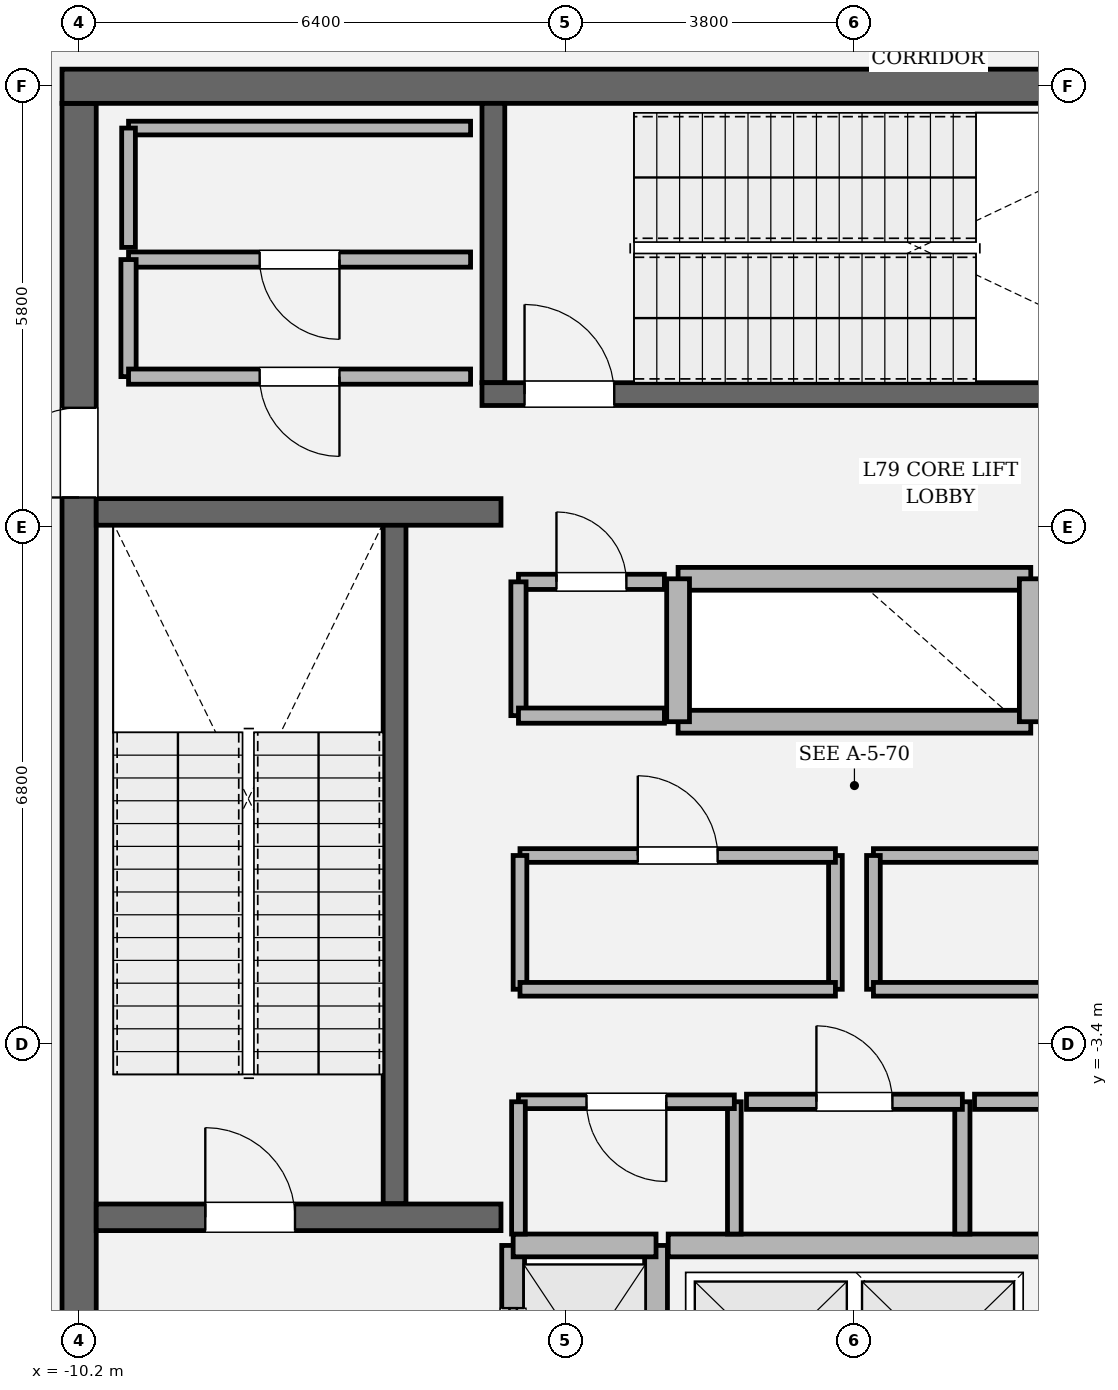
"""IFC4 building model, lengths in metres.
Left out: names, types, materials, properties, quantities, classifications, styles, units other than length and angle.
Written with IfcOpenShell. Run it as: python <this file> out.ifc"""

import sys

from ifc_helpers import new_model, si_unit, direction, frame, frame_2d, origin, place, context, subcontext, project, spatial, rectangle, extrude, element, fill, save


model = new_model("IFC4")
c1 = context("Model", 3, precision=1e-05, world=origin(), true_north=direction((0.0, 1.0)))
c2 = subcontext(c1, "Body", "Model", "MODEL_VIEW")
j1 = project(units=[si_unit("LENGTHUNIT", "METRE"), si_unit("PLANEANGLEUNIT", "RADIAN")], contexts=[c1])
p1 = place(None, origin())
s1 = spatial("IfcSite", under=j1, at=p1, CompositionType="ELEMENT")
p2 = place(p1, origin())
s2 = spatial("IfcBuilding", under=s1, at=p2, CompositionType="ELEMENT")
p3 = place(p2, frame((0.0, 0.0, 334.2)))
s3 = spatial("IfcBuildingStorey", under=s2, at=p3, CompositionType="ELEMENT", Elevation=334.2)
p4 = place(p3, frame((-10.2, -8.975, 0.0), z_axis=(0.0, 0.0, 1.0), x_axis=(0.0, 1.0, 0.0)))
e1 = element("IfcWall", 1, at=p4, inside=s3, PredefinedType="SHEAR", context=c2, shape_type="SweptSolid", body=[
    extrude(rectangle(XDim=17.95, YDim=0.45, at=frame_2d((8.975, 0.0))), origin(), (0.0, 0.0, 1.0), 4.8),
])
p5 = place(p4, frame((12.765, 0.0, 0.0)))
e2 = element("IfcOpeningElement", 2, at=p5, cuts=e1, PredefinedType="OPENING", context=c2, shape_type="SweptSolid", body=[
    extrude(rectangle(XDim=1.18, YDim=2.2, at=frame_2d((0.59, 1.1))), frame((0.0, 0.235, 0.0), z_axis=(0.0, -1.0, 0.0), x_axis=(1.0, 0.0, 0.0)), (0.0, 0.0, 1.0), 0.47),
])
p6 = place(p3, frame((-10.425, 9.2, 0.0), z_axis=(0.0, 0.0, 1.0), x_axis=(1.0, 0.0, 0.0)))
e3 = element("IfcWall", 3, at=p6, inside=s3, PredefinedType="SHEAR", context=c2, shape_type="SweptSolid", body=[
    extrude(rectangle(XDim=20.85, YDim=0.45, at=frame_2d((10.425, 0.0))), origin(), (0.0, 0.0, 1.0), 4.8),
])
p7 = place(p3, frame((-6.05, -5.5, 0.0), z_axis=(0.0, 0.0, 1.0), x_axis=(0.0, 1.0, 0.0)))
e4 = element("IfcWall", 4, at=p7, inside=s3, PredefinedType="SOLIDWALL", context=c2, shape_type="SweptSolid", body=[
    extrude(rectangle(XDim=8.95, YDim=0.3, at=frame_2d((4.475, 0.0))), origin(), (0.0, 0.0, 1.0), 4.8),
])
p8 = place(p3, frame((-4.75, 5.3, 0.0), z_axis=(0.0, 0.0, 1.0), x_axis=(0.0, 1.0, 0.0)))
e5 = element("IfcWall", 5, at=p8, inside=s3, PredefinedType="SOLIDWALL", context=c2, shape_type="SweptSolid", body=[
    extrude(rectangle(XDim=3.675, YDim=0.3, at=frame_2d((1.837, 0.0))), origin(), (0.0, 0.0, 1.0), 4.8),
])
p9 = place(p3, frame((-4.9, 5.15, 0.0), z_axis=(0.0, 0.0, 1.0), x_axis=(1.0, 0.0, 0.0)))
e6 = element("IfcWall", 6, at=p9, inside=s3, PredefinedType="SOLIDWALL", context=c2, shape_type="SweptSolid", body=[
    extrude(rectangle(XDim=9.8, YDim=0.3, at=frame_2d((4.9, 0.0))), origin(), (0.0, 0.0, 1.0), 4.8),
])
p10 = place(p9, frame((0.56, 0.0, 0.0)))
e7 = element("IfcOpeningElement", 7, at=p10, cuts=e6, PredefinedType="OPENING", context=c2, shape_type="SweptSolid", body=[
    extrude(rectangle(XDim=1.18, YDim=2.2, at=frame_2d((0.59, 1.1))), frame((0.0, 0.16, 0.0), z_axis=(0.0, -1.0, 0.0), x_axis=(1.0, 0.0, 0.0)), (0.0, 0.0, 1.0), 0.32),
])
p11 = place(p3, frame((-9.975, -5.68, 0.0), z_axis=(0.0, 0.0, 1.0), x_axis=(1.0, 0.0, 0.0)))
e8 = element("IfcWall", 8, at=p11, inside=s3, PredefinedType="SOLIDWALL", context=c2, shape_type="SweptSolid", body=[
    extrude(rectangle(XDim=5.325, YDim=0.35, at=frame_2d((2.663, 0.0))), origin(), (0.0, 0.0, 1.0), 4.8),
])
p12 = place(p11, frame((1.435, 0.0, 0.0)))
e9 = element("IfcOpeningElement", 9, at=p12, cuts=e8, PredefinedType="OPENING", context=c2, shape_type="SweptSolid", body=[
    extrude(rectangle(XDim=1.18, YDim=2.2, at=frame_2d((0.59, 1.1))), frame((0.0, 0.185, 0.0), z_axis=(0.0, -1.0, 0.0), x_axis=(1.0, 0.0, 0.0)), (0.0, 0.0, 1.0), 0.37),
])
p13 = place(p3, frame((-9.975, 3.6, 0.0), z_axis=(0.0, 0.0, 1.0), x_axis=(1.0, 0.0, 0.0)))
e10 = element("IfcWall", 10, at=p13, inside=s3, PredefinedType="SOLIDWALL", context=c2, shape_type="SweptSolid", body=[
    extrude(rectangle(XDim=5.325, YDim=0.35, at=frame_2d((2.663, 0.0))), origin(), (0.0, 0.0, 1.0), 4.8),
])
p14 = place(p3, frame((-4.49, -8.82, 0.0), z_axis=(0.0, 0.0, 1.0), x_axis=(0.0, 1.0, 0.0)))
e11 = element("IfcWall", 11, at=p14, inside=s3, PredefinedType="SOLIDWALL", context=c2, shape_type="SweptSolid", body=[
    extrude(rectangle(XDim=2.77, YDim=0.3, at=frame_2d((1.385, 0.0))), origin(), (0.0, 0.0, 1.0), 4.54),
])
p15 = place(p14, frame((0.825, 0.0, 0.0)))
e12 = element("IfcOpeningElement", 12, at=p15, cuts=e11, PredefinedType="OPENING", context=c2, shape_type="SweptSolid", body=[
    extrude(rectangle(XDim=1.12, YDim=2.25, at=frame_2d((0.56, 1.125))), frame((0.0, 0.16, 0.0), z_axis=(0.0, -1.0, 0.0), x_axis=(1.0, 0.0, 0.0)), (0.0, 0.0, 1.0), 0.32),
])
p16 = place(p3, frame((-2.61, -8.82, 0.0), z_axis=(0.0, 0.0, 1.0), x_axis=(0.0, 1.0, 0.0)))
e13 = element("IfcWall", 13, at=p16, inside=s3, PredefinedType="SOLIDWALL", context=c2, shape_type="SweptSolid", body=[
    extrude(rectangle(XDim=2.77, YDim=0.3, at=frame_2d((1.385, 0.0))), origin(), (0.0, 0.0, 1.0), 4.54),
])
p17 = place(p3, frame((-4.49, -6.05, 0.0), z_axis=(0.0, 0.0, 1.0), x_axis=(1.0, 0.0, 0.0)))
e14 = element("IfcWall", 14, at=p17, inside=s3, PredefinedType="SOLIDWALL", context=c2, shape_type="SweptSolid", body=[
    extrude(rectangle(XDim=1.88, YDim=0.3, at=frame_2d((0.94, 0.0))), origin(), (0.0, 0.0, 1.0), 4.54),
])
for number, where, z_axis, x_axis in (
    (15, (-2.32, 0.84, 0.0), (0.0, 0.0, 1.0), (1.0, 0.0, 0.0)),
    (16, (-2.32, 2.72, 0.0), (0.0, 0.0, 1.0), (1.0, 0.0, 0.0)),
):
    element("IfcWall", number, at=place(p3, frame(where, z_axis=z_axis, x_axis=x_axis)), inside=s3, PredefinedType="SOLIDWALL", context=c2, shape_type="SweptSolid", body=[
        extrude(rectangle(XDim=4.64, YDim=0.3, at=frame_2d((2.32, 0.0))), origin(), (0.0, 0.0, 1.0), 4.54),
    ])
for number, where, z_axis, x_axis in (
    (17, (-2.32, 0.84, 0.0), (0.0, 0.0, 1.0), (0.0, 1.0, 0.0)),
    (18, (2.32, 0.84, 0.0), (0.0, 0.0, 1.0), (0.0, 1.0, 0.0)),
):
    element("IfcWall", number, at=place(p3, frame(where, z_axis=z_axis, x_axis=x_axis)), inside=s3, PredefinedType="SOLIDWALL", context=c2, shape_type="SweptSolid", body=[
        extrude(rectangle(XDim=1.88, YDim=0.3, at=frame_2d((0.94, 0.0))), origin(), (0.0, 0.0, 1.0), 4.54),
    ])
p18 = place(p3, frame((-2.45, -6.05, 0.0), z_axis=(0.0, 0.0, 1.0), x_axis=(1.0, 0.0, 0.0)))
e19 = element("IfcWall", 19, at=p18, inside=s3, PredefinedType="SOLIDWALL", context=c2, shape_type="SweptSolid", body=[
    extrude(rectangle(XDim=4.9, YDim=0.3, at=frame_2d((2.45, 0.0))), origin(), (0.0, 0.0, 1.0), 4.54),
])
p19 = place(p3, frame((-1.58, -5.9, 0.0), z_axis=(0.0, 0.0, 1.0), x_axis=(0.0, 1.0, 0.0)))
e20 = element("IfcWall", 20, at=p19, inside=s3, PredefinedType="PARTITIONING", context=c2, shape_type="SweptSolid", body=[
    extrude(rectangle(XDim=1.74, YDim=0.18, at=frame_2d((0.87, 0.0))), origin(), (0.0, 0.0, 1.0), 4.54),
])
p20 = place(p3, frame((-1.58, -4.16, 0.0), z_axis=(0.0, 0.0, 1.0), x_axis=(-1.0, 0.0, 0.0)))
e21 = element("IfcWall", 21, at=p20, inside=s3, PredefinedType="PARTITIONING", context=c2, shape_type="SweptSolid", body=[
    extrude(rectangle(XDim=2.84, YDim=0.18, at=frame_2d((1.42, 0.0))), origin(), (0.0, 0.0, 1.0), 4.54),
])
p21 = place(p20, frame((0.895, 0.0, 0.0)))
e22 = element("IfcOpeningElement", 22, at=p21, cuts=e21, PredefinedType="OPENING", context=c2, shape_type="SweptSolid", body=[
    extrude(rectangle(XDim=1.05, YDim=2.2, at=frame_2d((0.525, 1.1))), frame((0.0, 0.1, 0.0), z_axis=(0.0, -1.0, 0.0), x_axis=(1.0, 0.0, 0.0)), (0.0, 0.0, 1.0), 0.2),
])
p22 = place(p3, frame((-4.42, -4.16, 0.0), z_axis=(0.0, 0.0, 1.0), x_axis=(0.0, -1.0, 0.0)))
e23 = element("IfcWall", 23, at=p22, inside=s3, PredefinedType="PARTITIONING", context=c2, shape_type="SweptSolid", body=[
    extrude(rectangle(XDim=1.74, YDim=0.18, at=frame_2d((0.87, 0.0))), origin(), (0.0, 0.0, 1.0), 4.54),
])
p23 = place(p3, frame((1.42, -5.9, 0.0), z_axis=(0.0, 0.0, 1.0), x_axis=(0.0, 1.0, 0.0)))
e24 = element("IfcWall", 24, at=p23, inside=s3, PredefinedType="SOLIDWALL", context=c2, shape_type="SweptSolid", body=[
    extrude(rectangle(XDim=1.74, YDim=0.2, at=frame_2d((0.87, 0.0))), origin(), (0.0, 0.0, 1.0), 4.54),
])
p24 = place(p3, frame((1.42, -4.16, 0.0), z_axis=(0.0, 0.0, 1.0), x_axis=(-1.0, 0.0, 0.0)))
e25 = element("IfcWall", 25, at=p24, inside=s3, PredefinedType="SOLIDWALL", context=c2, shape_type="SweptSolid", body=[
    extrude(rectangle(XDim=2.84, YDim=0.2, at=frame_2d((1.42, 0.0))), origin(), (0.0, 0.0, 1.0), 4.54),
])
p25 = place(p24, frame((0.92, 0.0, 0.0)))
e26 = element("IfcOpeningElement", 26, at=p25, cuts=e25, PredefinedType="OPENING", context=c2, shape_type="SweptSolid", body=[
    extrude(rectangle(XDim=1.0, YDim=2.15, at=frame_2d((0.5, 1.075))), frame((0.0, 0.11, 0.0), z_axis=(0.0, -1.0, 0.0), x_axis=(1.0, 0.0, 0.0)), (0.0, 0.0, 1.0), 0.22),
])
p26 = place(p3, frame((4.42, -4.16, 0.0), z_axis=(0.0, 0.0, 1.0), x_axis=(-1.0, 0.0, 0.0)))
e27 = element("IfcWall", 27, at=p26, inside=s3, PredefinedType="SOLIDWALL", context=c2, shape_type="SweptSolid", body=[
    extrude(rectangle(XDim=2.84, YDim=0.2, at=frame_2d((1.42, 0.0))), origin(), (0.0, 0.0, 1.0), 4.54),
])
p27 = place(p26, frame((0.945, 0.0, 0.0)))
e28 = element("IfcOpeningElement", 28, at=p27, cuts=e27, PredefinedType="OPENING", context=c2, shape_type="SweptSolid", body=[
    extrude(rectangle(XDim=0.95, YDim=2.15, at=frame_2d((0.475, 1.075))), frame((0.0, 0.11, 0.0), z_axis=(0.0, -1.0, 0.0), x_axis=(1.0, 0.0, 0.0)), (0.0, 0.0, 1.0), 0.22),
])
p28 = place(p3, frame((-0.25, -2.68, 0.0), z_axis=(0.0, 0.0, 1.0), x_axis=(0.0, 1.0, 0.0)))
e29 = element("IfcWall", 29, at=p28, inside=s3, PredefinedType="PARTITIONING", context=c2, shape_type="SweptSolid", body=[
    extrude(rectangle(XDim=1.76, YDim=0.18, at=frame_2d((0.88, 0.0))), origin(), (0.0, 0.0, 1.0), 4.54),
])
p29 = place(p3, frame((-0.25, -0.92, 0.0), z_axis=(0.0, 0.0, 1.0), x_axis=(-1.0, 0.0, 0.0)))
e30 = element("IfcWall", 30, at=p29, inside=s3, PredefinedType="PARTITIONING", context=c2, shape_type="SweptSolid", body=[
    extrude(rectangle(XDim=4.15, YDim=0.18, at=frame_2d((2.075, 0.0))), origin(), (0.0, 0.0, 1.0), 4.54),
])
p30 = place(p29, frame((1.55, 0.0, 0.0)))
e31 = element("IfcOpeningElement", 31, at=p30, cuts=e30, PredefinedType="OPENING", context=c2, shape_type="SweptSolid", body=[
    extrude(rectangle(XDim=1.05, YDim=2.2, at=frame_2d((0.525, 1.1))), frame((0.0, 0.1, 0.0), z_axis=(0.0, -1.0, 0.0), x_axis=(1.0, 0.0, 0.0)), (0.0, 0.0, 1.0), 0.2),
])
p31 = place(p3, frame((-4.4, -0.92, 0.0), z_axis=(0.0, 0.0, 1.0), x_axis=(0.0, -1.0, 0.0)))
e32 = element("IfcWall", 32, at=p31, inside=s3, PredefinedType="PARTITIONING", context=c2, shape_type="SweptSolid", body=[
    extrude(rectangle(XDim=1.76, YDim=0.18, at=frame_2d((0.88, 0.0))), origin(), (0.0, 0.0, 1.0), 4.54),
])
for number, where, z_axis, x_axis in (
    (33, (-4.4, -2.68, 0.0), (0.0, 0.0, 1.0), (1.0, 0.0, 0.0)),
    (34, (4.4, -0.92, 0.0), (0.0, 0.0, 1.0), (-1.0, 0.0, 0.0)),
):
    element("IfcWall", number, at=place(p3, frame(where, z_axis=z_axis, x_axis=x_axis)), inside=s3, PredefinedType="PARTITIONING", context=c2, shape_type="SweptSolid", body=[
        extrude(rectangle(XDim=4.15, YDim=0.18, at=frame_2d((2.075, 0.0))), origin(), (0.0, 0.0, 1.0), 4.54),
    ])
p32 = place(p3, frame((0.25, -0.92, 0.0), z_axis=(0.0, 0.0, 1.0), x_axis=(0.0, -1.0, 0.0)))
e35 = element("IfcWall", 35, at=p32, inside=s3, PredefinedType="PARTITIONING", context=c2, shape_type="SweptSolid", body=[
    extrude(rectangle(XDim=1.76, YDim=0.18, at=frame_2d((0.88, 0.0))), origin(), (0.0, 0.0, 1.0), 4.54),
])
p33 = place(p3, frame((0.25, -2.68, 0.0), z_axis=(0.0, 0.0, 1.0), x_axis=(1.0, 0.0, 0.0)))
e36 = element("IfcWall", 36, at=p33, inside=s3, PredefinedType="PARTITIONING", context=c2, shape_type="SweptSolid", body=[
    extrude(rectangle(XDim=4.15, YDim=0.18, at=frame_2d((2.075, 0.0))), origin(), (0.0, 0.0, 1.0), 4.54),
])
p34 = place(p3, frame((-2.5, 2.68, 0.0), z_axis=(0.0, 0.0, 1.0), x_axis=(-1.0, 0.0, 0.0)))
e37 = element("IfcWall", 37, at=p34, inside=s3, PredefinedType="SOLIDWALL", context=c2, shape_type="SweptSolid", body=[
    extrude(rectangle(XDim=1.92, YDim=0.2, at=frame_2d((0.96, 0.0))), origin(), (0.0, 0.0, 1.0), 4.54),
])
p35 = place(p34, frame((0.5, 0.0, 0.0)))
e38 = element("IfcOpeningElement", 38, at=p35, cuts=e37, PredefinedType="OPENING", context=c2, shape_type="SweptSolid", body=[
    extrude(rectangle(XDim=0.92, YDim=2.1, at=frame_2d((0.46, 1.05))), frame((0.0, 0.11, 0.0), z_axis=(0.0, -1.0, 0.0), x_axis=(1.0, 0.0, 0.0)), (0.0, 0.0, 1.0), 0.22),
])
p36 = place(p3, frame((-4.42, 2.68, 0.0), z_axis=(0.0, 0.0, 1.0), x_axis=(0.0, -1.0, 0.0)))
e39 = element("IfcWall", 39, at=p36, inside=s3, PredefinedType="SOLIDWALL", context=c2, shape_type="SweptSolid", body=[
    extrude(rectangle(XDim=1.76, YDim=0.2, at=frame_2d((0.88, 0.0))), origin(), (0.0, 0.0, 1.0), 4.54),
])
p37 = place(p3, frame((-4.42, 0.92, 0.0), z_axis=(0.0, 0.0, 1.0), x_axis=(1.0, 0.0, 0.0)))
e40 = element("IfcWall", 40, at=p37, inside=s3, PredefinedType="SOLIDWALL", context=c2, shape_type="SweptSolid", body=[
    extrude(rectangle(XDim=1.92, YDim=0.2, at=frame_2d((0.96, 0.0))), origin(), (0.0, 0.0, 1.0), 4.54),
])
p38 = place(p3, frame((-5.05, 6.92, 0.0), z_axis=(0.0, 0.0, 1.0), x_axis=(-1.0, 0.0, 0.0)))
e41 = element("IfcWall", 41, at=p38, inside=s3, PredefinedType="SOLIDWALL", context=c2, shape_type="SweptSolid", body=[
    extrude(rectangle(XDim=4.5, YDim=0.2, at=frame_2d((2.25, 0.0))), origin(), (0.0, 0.0, 1.0), 4.54),
])
p39 = place(p38, frame((1.725, 0.0, 0.0)))
e42 = element("IfcOpeningElement", 42, at=p39, cuts=e41, PredefinedType="OPENING", context=c2, shape_type="SweptSolid", body=[
    extrude(rectangle(XDim=1.05, YDim=2.2, at=frame_2d((0.525, 1.1))), frame((0.0, 0.11, 0.0), z_axis=(0.0, -1.0, 0.0), x_axis=(1.0, 0.0, 0.0)), (0.0, 0.0, 1.0), 0.22),
])
p40 = place(p3, frame((-9.55, 6.92, 0.0), z_axis=(0.0, 0.0, 1.0), x_axis=(0.0, -1.0, 0.0)))
e43 = element("IfcWall", 43, at=p40, inside=s3, PredefinedType="SOLIDWALL", context=c2, shape_type="SweptSolid", body=[
    extrude(rectangle(XDim=1.54, YDim=0.2, at=frame_2d((0.77, 0.0))), origin(), (0.0, 0.0, 1.0), 4.54),
])
p41 = place(p3, frame((-9.55, 5.38, 0.0), z_axis=(0.0, 0.0, 1.0), x_axis=(1.0, 0.0, 0.0)))
e44 = element("IfcWall", 44, at=p41, inside=s3, PredefinedType="SOLIDWALL", context=c2, shape_type="SweptSolid", body=[
    extrude(rectangle(XDim=4.5, YDim=0.2, at=frame_2d((2.25, 0.0))), origin(), (0.0, 0.0, 1.0), 4.54),
])
p42 = place(p41, frame((1.725, 0.0, 0.0)))
e45 = element("IfcOpeningElement", 45, at=p42, cuts=e44, PredefinedType="OPENING", context=c2, shape_type="SweptSolid", body=[
    extrude(rectangle(XDim=1.05, YDim=2.2, at=frame_2d((0.525, 1.1))), frame((0.0, 0.11, 0.0), z_axis=(0.0, -1.0, 0.0), x_axis=(1.0, 0.0, 0.0)), (0.0, 0.0, 1.0), 0.22),
])
p43 = place(p3, frame((-5.05, 8.65, 0.0), z_axis=(0.0, 0.0, 1.0), x_axis=(-1.0, 0.0, 0.0)))
e46 = element("IfcWall", 46, at=p43, inside=s3, PredefinedType="PARTITIONING", context=c2, shape_type="SweptSolid", body=[
    extrude(rectangle(XDim=4.5, YDim=0.18, at=frame_2d((2.25, 0.0))), origin(), (0.0, 0.0, 1.0), 4.54),
])
p44 = place(p3, frame((-9.55, 8.65, 0.0), z_axis=(0.0, 0.0, 1.0), x_axis=(0.0, -1.0, 0.0)))
e47 = element("IfcWall", 47, at=p44, inside=s3, PredefinedType="PARTITIONING", context=c2, shape_type="SweptSolid", body=[
    extrude(rectangle(XDim=1.57, YDim=0.18, at=frame_2d((0.785, 0.0))), origin(), (0.0, 0.0, 1.0), 4.54),
])
p45 = place(p12, origin())
e48 = element("IfcDoor", 48, at=p45, inside=s3, OperationType="SINGLE_SWING_LEFT", PredefinedType="DOOR", context=c2, shape_type="SweptSolid", body=[
    extrude(rectangle(XDim=1.18, YDim=2.2, at=frame_2d((0.59, 1.1))), frame((0.0, 0.025, 0.0), z_axis=(0.0, -1.0, 0.0), x_axis=(1.0, 0.0, 0.0)), (0.0, 0.0, 1.0), 0.05),
])
fill(e9, e48)
p46 = place(p10, origin())
e49 = element("IfcDoor", 49, at=p46, inside=s3, OperationType="SINGLE_SWING_LEFT", PredefinedType="DOOR", context=c2, shape_type="SweptSolid", body=[
    extrude(rectangle(XDim=1.18, YDim=2.2, at=frame_2d((0.59, 1.1))), frame((0.0, 0.025, 0.0), z_axis=(0.0, -1.0, 0.0), x_axis=(1.0, 0.0, 0.0)), (0.0, 0.0, 1.0), 0.05),
])
fill(e7, e49)
p47 = place(p5, origin())
e50 = element("IfcDoor", 50, at=p47, inside=s3, OperationType="SINGLE_SWING_LEFT", PredefinedType="DOOR", context=c2, shape_type="SweptSolid", body=[
    extrude(rectangle(XDim=1.18, YDim=2.2, at=frame_2d((0.59, 1.1))), frame((0.0, 0.025, 0.0), z_axis=(0.0, -1.0, 0.0), x_axis=(1.0, 0.0, 0.0)), (0.0, 0.0, 1.0), 0.05),
])
fill(e2, e50)
p48 = place(p15, origin())
e51 = element("IfcDoor", 51, at=p48, inside=s3, OperationType="SLIDING_TO_LEFT", PredefinedType="DOOR", context=c2, shape_type="SweptSolid", body=[
    extrude(rectangle(XDim=1.12, YDim=2.25, at=frame_2d((0.56, 1.125))), frame((0.0, 0.025, 0.0), z_axis=(0.0, -1.0, 0.0), x_axis=(1.0, 0.0, 0.0)), (0.0, 0.0, 1.0), 0.05),
])
fill(e12, e51)
p49 = place(p21, origin())
e52 = element("IfcDoor", 52, at=p49, inside=s3, OperationType="SINGLE_SWING_LEFT", PredefinedType="DOOR", context=c2, shape_type="SweptSolid", body=[
    extrude(rectangle(XDim=1.05, YDim=2.2, at=frame_2d((0.525, 1.1))), frame((0.0, 0.025, 0.0), z_axis=(0.0, -1.0, 0.0), x_axis=(1.0, 0.0, 0.0)), (0.0, 0.0, 1.0), 0.05),
])
fill(e22, e52)
p50 = place(p25, origin())
e53 = element("IfcDoor", 53, at=p50, inside=s3, OperationType="SINGLE_SWING_RIGHT", PredefinedType="DOOR", context=c2, shape_type="SweptSolid", body=[
    extrude(rectangle(XDim=1.0, YDim=2.15, at=frame_2d((0.5, 1.075))), frame((0.0, 0.025, 0.0), z_axis=(0.0, -1.0, 0.0), x_axis=(1.0, 0.0, 0.0)), (0.0, 0.0, 1.0), 0.05),
])
fill(e26, e53)
p51 = place(p30, origin())
e54 = element("IfcDoor", 54, at=p51, inside=s3, OperationType="SINGLE_SWING_RIGHT", PredefinedType="DOOR", context=c2, shape_type="SweptSolid", body=[
    extrude(rectangle(XDim=1.05, YDim=2.2, at=frame_2d((0.525, 1.1))), frame((0.0, 0.025, 0.0), z_axis=(0.0, -1.0, 0.0), x_axis=(1.0, 0.0, 0.0)), (0.0, 0.0, 1.0), 0.05),
])
fill(e31, e54)
p52 = place(p35, origin())
e55 = element("IfcDoor", 55, at=p52, inside=s3, OperationType="SINGLE_SWING_RIGHT", PredefinedType="DOOR", context=c2, shape_type="SweptSolid", body=[
    extrude(rectangle(XDim=0.92, YDim=2.1, at=frame_2d((0.46, 1.05))), frame((0.0, 0.025, 0.0), z_axis=(0.0, -1.0, 0.0), x_axis=(1.0, 0.0, 0.0)), (0.0, 0.0, 1.0), 0.05),
])
fill(e38, e55)
p53 = place(p42, origin())
e56 = element("IfcDoor", 56, at=p53, inside=s3, OperationType="SINGLE_SWING_RIGHT", PredefinedType="DOOR", context=c2, shape_type="SweptSolid", body=[
    extrude(rectangle(XDim=1.05, YDim=2.2, at=frame_2d((0.525, 1.1))), frame((0.0, 0.025, 0.0), z_axis=(0.0, -1.0, 0.0), x_axis=(1.0, 0.0, 0.0)), (0.0, 0.0, 1.0), 0.05),
])
fill(e45, e56)
p54 = place(p39, origin())
e57 = element("IfcDoor", 57, at=p54, inside=s3, OperationType="SINGLE_SWING_LEFT", PredefinedType="DOOR", context=c2, shape_type="SweptSolid", body=[
    extrude(rectangle(XDim=1.05, YDim=2.2, at=frame_2d((0.525, 1.1))), frame((0.0, 0.025, 0.0), z_axis=(0.0, -1.0, 0.0), x_axis=(1.0, 0.0, 0.0)), (0.0, 0.0, 1.0), 0.05),
])
fill(e42, e57)
save(model, sys.argv[1])
